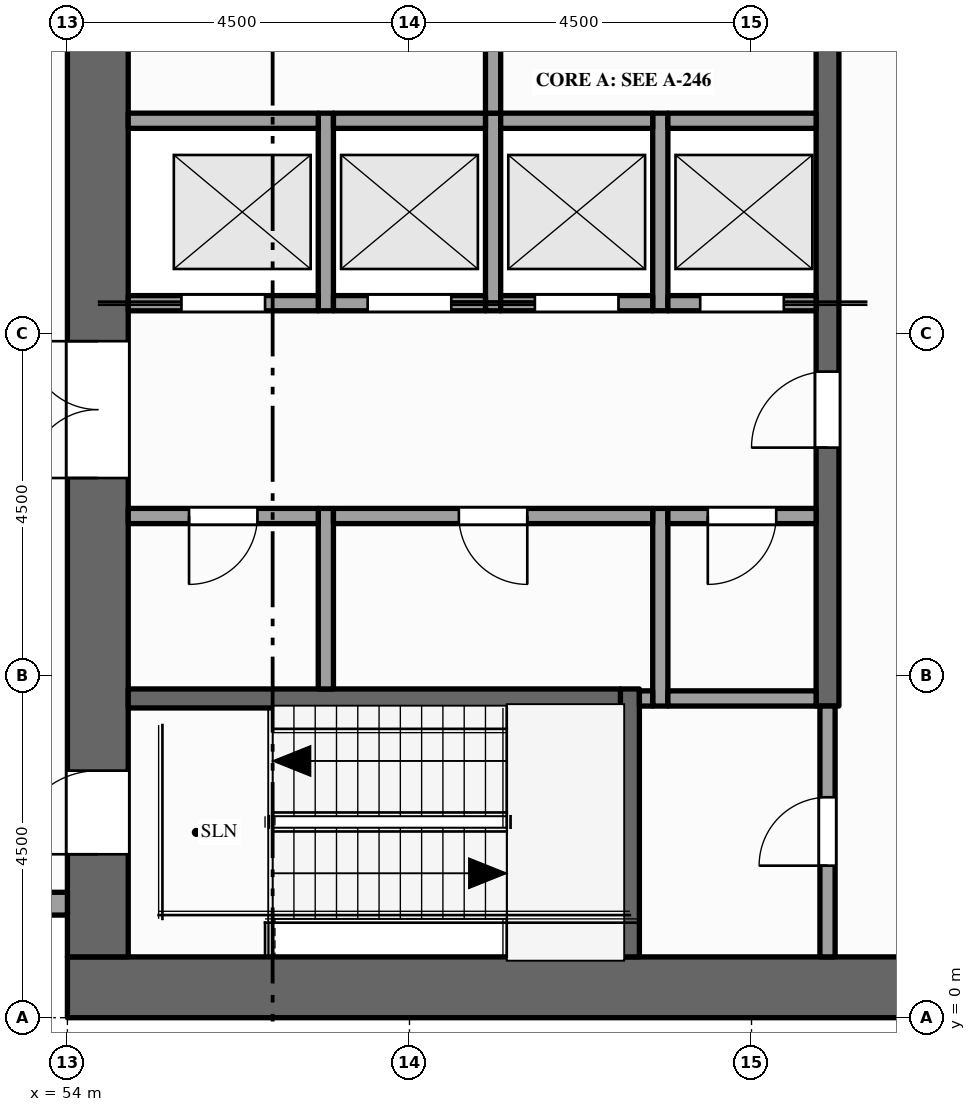
"""IFC4 building model, lengths in metres.
Left out: names, types, materials, properties, quantities, classifications, styles, units other than length and angle.
Written with IfcOpenShell. Run it as: python <this file> out.ifc"""

import sys

from ifc_helpers import new_model, si_unit, direction, frame, frame_2d, origin, place, context, subcontext, project, spatial, rectangle, extrude, element, fill, save


model = new_model("IFC4")
c1 = context("Model", 3, precision=1e-05, world=origin(), true_north=direction((0.0, 1.0)))
c2 = subcontext(c1, "Body", "Model", "MODEL_VIEW")
j1 = project(units=[si_unit("LENGTHUNIT", "METRE"), si_unit("PLANEANGLEUNIT", "RADIAN")], contexts=[c1])
p1 = place(None, origin())
s1 = spatial("IfcSite", under=j1, at=p1, CompositionType="ELEMENT")
p2 = place(p1, origin())
s2 = spatial("IfcBuilding", under=s1, at=p2, CompositionType="ELEMENT")
p3 = place(p2, frame((0.0, 0.0, 261.0)))
s3 = spatial("IfcBuildingStorey", under=s2, at=p3, CompositionType="ELEMENT", Elevation=261.0)
p4 = place(p3, frame((67.5, 0.4, -0.15), z_axis=(0.0, 0.0, 1.0), x_axis=(-1.0, 0.0, 0.0)))
e1 = element("IfcWall", 1, at=p4, inside=s3, PredefinedType="SHEAR", context=c2, shape_type="SweptSolid", body=[
    extrude(rectangle(XDim=13.5, YDim=0.8, at=frame_2d((6.75, 0.0))), origin(), (0.0, 0.0, 1.0), 4.0),
])
p5 = place(p3, frame((54.4, 0.8, -0.15), z_axis=(0.0, 0.0, 1.0), x_axis=(0.0, 1.0, 0.0)))
e2 = element("IfcWall", 2, at=p5, inside=s3, PredefinedType="SHEAR", context=c2, shape_type="SweptSolid", body=[
    extrude(rectangle(XDim=20.9, YDim=0.8, at=frame_2d((10.45, 0.0))), origin(), (0.0, 0.0, 1.0), 4.0),
])
p6 = place(p5, frame((6.3, 0.0, 0.15)))
e3 = element("IfcOpeningElement", 3, at=p6, cuts=e2, PredefinedType="OPENING", context=c2, shape_type="SweptSolid", body=[
    extrude(rectangle(XDim=1.8, YDim=2.1, at=frame_2d((0.9, 1.05))), frame((0.0, 0.41, 0.0), z_axis=(0.0, -1.0, 0.0), x_axis=(1.0, 0.0, 0.0)), (0.0, 0.0, 1.0), 0.82),
])
p7 = place(p5, frame((12.35, 0.0, 0.15)))
e4 = element("IfcOpeningElement", 4, at=p7, cuts=e2, PredefinedType="OPENING", context=c2, shape_type="SweptSolid", body=[
    extrude(rectangle(XDim=1.1, YDim=2.1, at=frame_2d((0.55, 1.05))), frame((0.0, 0.41, 0.0), z_axis=(0.0, -1.0, 0.0), x_axis=(1.0, 0.0, 0.0)), (0.0, 0.0, 1.0), 0.82),
])
p8 = place(p5, frame((1.35, 0.0, 0.15)))
e5 = element("IfcOpeningElement", 5, at=p8, cuts=e2, PredefinedType="OPENING", context=c2, shape_type="SweptSolid", body=[
    extrude(rectangle(XDim=1.1, YDim=2.1, at=frame_2d((0.55, 1.05))), frame((0.0, 0.41, 0.0), z_axis=(0.0, -1.0, 0.0), x_axis=(1.0, 0.0, 0.0)), (0.0, 0.0, 1.0), 0.82),
])
p9 = place(p5, frame((18.55, 0.0, 0.15)))
e6 = element("IfcOpeningElement", 6, at=p9, cuts=e2, PredefinedType="OPENING", context=c2, shape_type="SweptSolid", body=[
    extrude(rectangle(XDim=1.1, YDim=2.1, at=frame_2d((0.55, 1.05))), frame((0.0, 0.41, 0.0), z_axis=(0.0, -1.0, 0.0), x_axis=(1.0, 0.0, 0.0)), (0.0, 0.0, 1.0), 0.82),
])
p10 = place(p3, frame((49.825, 1.5, 0.0), z_axis=(0.0, 0.0, 1.0), x_axis=(1.0, 0.0, 0.0)))
e7 = element("IfcWall", 7, at=p10, inside=s3, PredefinedType="STANDARD", context=c2, shape_type="SweptSolid", body=[
    extrude(rectangle(XDim=4.175, YDim=0.3, at=frame_2d((2.087, 0.0))), origin(), (0.0, 0.0, 1.0), 2.87),
])
p11 = place(p10, frame((0.413, 0.0, 0.9)))
e8 = element("IfcOpeningElement", 8, at=p11, cuts=e7, PredefinedType="OPENING", context=c2, shape_type="SweptSolid", body=[
    extrude(rectangle(XDim=1.2, YDim=1.75, at=frame_2d((0.6, 0.875))), frame((0.0, 0.16, 0.0), z_axis=(0.0, -1.0, 0.0), x_axis=(1.0, 0.0, 0.0)), (0.0, 0.0, 1.0), 0.32),
])
p12 = place(p10, frame((2.225, 0.0, 0.9)))
e9 = element("IfcOpeningElement", 9, at=p12, cuts=e7, PredefinedType="OPENING", context=c2, shape_type="SweptSolid", body=[
    extrude(rectangle(XDim=1.55, YDim=1.75, at=frame_2d((0.775, 0.875))), frame((0.0, 0.16, 0.0), z_axis=(0.0, -1.0, 0.0), x_axis=(1.0, 0.0, 0.0)), (0.0, 0.0, 1.0), 0.32),
])
p13 = place(p3, frame((57.4, 4.325, 0.0), z_axis=(0.0, 0.0, 1.0), x_axis=(0.0, 1.0, 0.0)))
e10 = element("IfcWall", 10, at=p13, inside=s3, PredefinedType="PARTITIONING", context=c2, shape_type="SweptSolid", body=[
    extrude(rectangle(XDim=2.375, YDim=0.2, at=frame_2d((1.188, 0.0))), origin(), (0.0, 0.0, 1.0), 3.85),
])
for number, where, z_axis, x_axis in (
    (11, (57.4, 9.3, 0.0), (0.0, 0.0, 1.0), (0.0, 1.0, 0.0)),
    (12, (59.6, 9.3, 0.0), (0.0, 0.0, 1.0), (0.0, 1.0, 0.0)),
):
    element("IfcWall", number, at=place(p3, frame(where, z_axis=z_axis, x_axis=x_axis)), inside=s3, PredefinedType="SOLIDWALL", context=c2, shape_type="SweptSolid", body=[
        extrude(rectangle(XDim=2.6, YDim=0.2, at=frame_2d((1.3, 0.0))), origin(), (0.0, 0.0, 1.0), 3.85),
    ])
p14 = place(p3, frame((59.6, 11.9, 0.0), z_axis=(0.0, 0.0, 1.0), x_axis=(0.0, 1.0, 0.0)))
e13 = element("IfcWall", 13, at=p14, inside=s3, PredefinedType="PARTITIONING", context=c2, shape_type="SweptSolid", body=[
    extrude(rectangle(XDim=3.6, YDim=0.2, at=frame_2d((1.8, 0.0))), origin(), (0.0, 0.0, 1.0), 3.85),
])
p15 = place(p14, frame((1.3, 0.0, 0.0)))
e14 = element("IfcOpeningElement", 14, at=p15, cuts=e13, PredefinedType="OPENING", context=c2, shape_type="SweptSolid", body=[
    extrude(rectangle(XDim=1.0, YDim=2.1, at=frame_2d((0.5, 1.05))), frame((0.0, 0.11, 0.0), z_axis=(0.0, -1.0, 0.0), x_axis=(1.0, 0.0, 0.0)), (0.0, 0.0, 1.0), 0.22),
])
p16 = place(p3, frame((61.4, 0.8, 0.0), z_axis=(0.0, 0.0, 1.0), x_axis=(0.0, 1.0, 0.0)))
e15 = element("IfcWall", 15, at=p16, inside=s3, PredefinedType="SHEAR", context=c2, shape_type="SweptSolid", body=[
    extrude(rectangle(XDim=3.525, YDim=0.25, at=frame_2d((1.762, 0.0))), origin(), (0.0, 0.0, 1.0), 3.85),
])
p17 = place(p3, frame((61.8, 4.1, 0.0), z_axis=(0.0, 0.0, 1.0), x_axis=(0.0, 1.0, 0.0)))
e16 = element("IfcWall", 16, at=p17, inside=s3, PredefinedType="PARTITIONING", context=c2, shape_type="SweptSolid", body=[
    extrude(rectangle(XDim=2.6, YDim=0.2, at=frame_2d((1.3, 0.0))), origin(), (0.0, 0.0, 1.0), 3.85),
])
p18 = place(p3, frame((61.8, 9.3, 0.0), z_axis=(0.0, 0.0, 1.0), x_axis=(0.0, 1.0, 0.0)))
e17 = element("IfcWall", 17, at=p18, inside=s3, PredefinedType="SOLIDWALL", context=c2, shape_type="SweptSolid", body=[
    extrude(rectangle(XDim=2.6, YDim=0.2, at=frame_2d((1.3, 0.0))), origin(), (0.0, 0.0, 1.0), 3.85),
])
p19 = place(p3, frame((64.0, 0.8, 0.0), z_axis=(0.0, 0.0, 1.0), x_axis=(0.0, 1.0, 0.0)))
e18 = element("IfcWall", 18, at=p19, inside=s3, PredefinedType="PARTITIONING", context=c2, shape_type="SweptSolid", body=[
    extrude(rectangle(XDim=3.3, YDim=0.2, at=frame_2d((1.65, 0.0))), origin(), (0.0, 0.0, 1.0), 3.85),
])
p20 = place(p19, frame((1.2, 0.0, 0.0)))
e19 = element("IfcOpeningElement", 19, at=p20, cuts=e18, PredefinedType="OPENING", context=c2, shape_type="SweptSolid", body=[
    extrude(rectangle(XDim=0.9, YDim=2.1, at=frame_2d((0.45, 1.05))), frame((0.0, 0.11, 0.0), z_axis=(0.0, -1.0, 0.0), x_axis=(1.0, 0.0, 0.0)), (0.0, 0.0, 1.0), 0.22),
])
p21 = place(p3, frame((64.0, 4.1, 0.0), z_axis=(0.0, 0.0, 1.0), x_axis=(0.0, 1.0, 0.0)))
e20 = element("IfcWall", 20, at=p21, inside=s3, PredefinedType="SHEAR", context=c2, shape_type="SweptSolid", body=[
    extrude(rectangle(XDim=14.5, YDim=0.3, at=frame_2d((7.25, 0.0))), origin(), (0.0, 0.0, 1.0), 3.85),
])
p22 = place(p21, frame((3.4, 0.0, 0.0)))
e21 = element("IfcOpeningElement", 21, at=p22, cuts=e20, PredefinedType="OPENING", context=c2, shape_type="SweptSolid", body=[
    extrude(rectangle(XDim=1.0, YDim=2.1, at=frame_2d((0.5, 1.05))), frame((0.0, 0.16, 0.0), z_axis=(0.0, -1.0, 0.0), x_axis=(1.0, 0.0, 0.0)), (0.0, 0.0, 1.0), 0.32),
])
p23 = place(p21, frame((9.1, 0.0, 0.0)))
e22 = element("IfcOpeningElement", 22, at=p23, cuts=e20, PredefinedType="OPENING", context=c2, shape_type="SweptSolid", body=[
    extrude(rectangle(XDim=1.0, YDim=2.1, at=frame_2d((0.5, 1.05))), frame((0.0, 0.16, 0.0), z_axis=(0.0, -1.0, 0.0), x_axis=(1.0, 0.0, 0.0)), (0.0, 0.0, 1.0), 0.32),
])
p24 = place(p3, frame((54.8, 4.2, 0.0), z_axis=(0.0, 0.0, 1.0), x_axis=(1.0, 0.0, 0.0)))
e23 = element("IfcWall", 23, at=p24, inside=s3, PredefinedType="SHEAR", context=c2, shape_type="SweptSolid", body=[
    extrude(rectangle(XDim=6.475, YDim=0.25, at=frame_2d((3.237, 0.0))), origin(), (0.0, 0.0, 1.0), 3.85),
])
p25 = place(p3, frame((61.525, 4.2, 0.0), z_axis=(0.0, 0.0, 1.0), x_axis=(1.0, 0.0, 0.0)))
e24 = element("IfcWall", 24, at=p25, inside=s3, PredefinedType="PARTITIONING", context=c2, shape_type="SweptSolid", body=[
    extrude(rectangle(XDim=0.175, YDim=0.2, at=frame_2d((0.087, 0.0))), origin(), (0.0, 0.0, 1.0), 3.85),
])
p26 = place(p3, frame((61.9, 4.2, 0.0), z_axis=(0.0, 0.0, 1.0), x_axis=(1.0, 0.0, 0.0)))
e25 = element("IfcWall", 25, at=p26, inside=s3, PredefinedType="PARTITIONING", context=c2, shape_type="SweptSolid", body=[
    extrude(rectangle(XDim=1.95, YDim=0.2, at=frame_2d((0.975, 0.0))), origin(), (0.0, 0.0, 1.0), 3.85),
])
p27 = place(p3, frame((54.8, 6.6, 0.0), z_axis=(0.0, 0.0, 1.0), x_axis=(1.0, 0.0, 0.0)))
e26 = element("IfcWall", 26, at=p27, inside=s3, PredefinedType="PARTITIONING", context=c2, shape_type="SweptSolid", body=[
    extrude(rectangle(XDim=2.5, YDim=0.2, at=frame_2d((1.25, 0.0))), origin(), (0.0, 0.0, 1.0), 3.85),
])
p28 = place(p27, frame((0.8, 0.0, 0.0)))
e27 = element("IfcOpeningElement", 27, at=p28, cuts=e26, PredefinedType="OPENING", context=c2, shape_type="SweptSolid", body=[
    extrude(rectangle(XDim=0.9, YDim=2.1, at=frame_2d((0.45, 1.05))), frame((0.0, 0.11, 0.0), z_axis=(0.0, -1.0, 0.0), x_axis=(1.0, 0.0, 0.0)), (0.0, 0.0, 1.0), 0.22),
])
p29 = place(p3, frame((57.5, 6.6, 0.0), z_axis=(0.0, 0.0, 1.0), x_axis=(1.0, 0.0, 0.0)))
e28 = element("IfcWall", 28, at=p29, inside=s3, PredefinedType="PARTITIONING", context=c2, shape_type="SweptSolid", body=[
    extrude(rectangle(XDim=4.2, YDim=0.2, at=frame_2d((2.1, 0.0))), origin(), (0.0, 0.0, 1.0), 3.85),
])
p30 = place(p29, frame((1.65, 0.0, 0.0)))
e29 = element("IfcOpeningElement", 29, at=p30, cuts=e28, PredefinedType="OPENING", context=c2, shape_type="SweptSolid", body=[
    extrude(rectangle(XDim=0.9, YDim=2.1, at=frame_2d((0.45, 1.05))), frame((0.0, 0.11, 0.0), z_axis=(0.0, -1.0, 0.0), x_axis=(1.0, 0.0, 0.0)), (0.0, 0.0, 1.0), 0.22),
])
p31 = place(p3, frame((61.9, 6.6, 0.0), z_axis=(0.0, 0.0, 1.0), x_axis=(1.0, 0.0, 0.0)))
e30 = element("IfcWall", 30, at=p31, inside=s3, PredefinedType="PARTITIONING", context=c2, shape_type="SweptSolid", body=[
    extrude(rectangle(XDim=1.95, YDim=0.2, at=frame_2d((0.975, 0.0))), origin(), (0.0, 0.0, 1.0), 3.85),
])
p32 = place(p31, frame((0.525, 0.0, 0.0)))
e31 = element("IfcOpeningElement", 31, at=p32, cuts=e30, PredefinedType="OPENING", context=c2, shape_type="SweptSolid", body=[
    extrude(rectangle(XDim=0.9, YDim=2.1, at=frame_2d((0.45, 1.05))), frame((0.0, 0.11, 0.0), z_axis=(0.0, -1.0, 0.0), x_axis=(1.0, 0.0, 0.0)), (0.0, 0.0, 1.0), 0.22),
])
p33 = place(p3, frame((54.8, 9.4, 0.0), z_axis=(0.0, 0.0, 1.0), x_axis=(1.0, 0.0, 0.0)))
e32 = element("IfcWall", 32, at=p33, inside=s3, PredefinedType="SOLIDWALL", context=c2, shape_type="SweptSolid", body=[
    extrude(rectangle(XDim=2.5, YDim=0.2, at=frame_2d((1.25, 0.0))), origin(), (0.0, 0.0, 1.0), 3.85),
])
p34 = place(p33, frame((0.7, 0.0, 0.012)))
e33 = element("IfcOpeningElement", 33, at=p34, cuts=e32, PredefinedType="OPENING", context=c2, shape_type="SweptSolid", body=[
    extrude(rectangle(XDim=1.1, YDim=2.1, at=frame_2d((0.55, 1.05))), frame((0.0, 0.11, 0.0), z_axis=(0.0, -1.0, 0.0), x_axis=(1.0, 0.0, 0.0)), (0.0, 0.0, 1.0), 0.22),
])
p35 = place(p3, frame((57.5, 9.4, 0.0), z_axis=(0.0, 0.0, 1.0), x_axis=(1.0, 0.0, 0.0)))
e34 = element("IfcWall", 34, at=p35, inside=s3, PredefinedType="SOLIDWALL", context=c2, shape_type="SweptSolid", body=[
    extrude(rectangle(XDim=2.0, YDim=0.2, at=frame_2d((1.0, 0.0))), origin(), (0.0, 0.0, 1.0), 3.85),
])
p36 = place(p35, frame((0.45, 0.0, 0.012)))
e35 = element("IfcOpeningElement", 35, at=p36, cuts=e34, PredefinedType="OPENING", context=c2, shape_type="SweptSolid", body=[
    extrude(rectangle(XDim=1.1, YDim=2.1, at=frame_2d((0.55, 1.05))), frame((0.0, 0.11, 0.0), z_axis=(0.0, -1.0, 0.0), x_axis=(1.0, 0.0, 0.0)), (0.0, 0.0, 1.0), 0.22),
])
p37 = place(p3, frame((59.7, 9.4, 0.0), z_axis=(0.0, 0.0, 1.0), x_axis=(1.0, 0.0, 0.0)))
e36 = element("IfcWall", 36, at=p37, inside=s3, PredefinedType="SOLIDWALL", context=c2, shape_type="SweptSolid", body=[
    extrude(rectangle(XDim=2.0, YDim=0.2, at=frame_2d((1.0, 0.0))), origin(), (0.0, 0.0, 1.0), 3.85),
])
p38 = place(p37, frame((0.45, 0.0, 0.012)))
e37 = element("IfcOpeningElement", 37, at=p38, cuts=e36, PredefinedType="OPENING", context=c2, shape_type="SweptSolid", body=[
    extrude(rectangle(XDim=1.1, YDim=2.1, at=frame_2d((0.55, 1.05))), frame((0.0, 0.11, 0.0), z_axis=(0.0, -1.0, 0.0), x_axis=(1.0, 0.0, 0.0)), (0.0, 0.0, 1.0), 0.22),
])
p39 = place(p3, frame((61.9, 9.4, 0.0), z_axis=(0.0, 0.0, 1.0), x_axis=(1.0, 0.0, 0.0)))
e38 = element("IfcWall", 38, at=p39, inside=s3, PredefinedType="SOLIDWALL", context=c2, shape_type="SweptSolid", body=[
    extrude(rectangle(XDim=1.95, YDim=0.2, at=frame_2d((0.975, 0.0))), origin(), (0.0, 0.0, 1.0), 3.85),
])
p40 = place(p39, frame((0.425, 0.0, 0.012)))
e39 = element("IfcOpeningElement", 39, at=p40, cuts=e38, PredefinedType="OPENING", context=c2, shape_type="SweptSolid", body=[
    extrude(rectangle(XDim=1.1, YDim=2.1, at=frame_2d((0.55, 1.05))), frame((0.0, 0.11, 0.0), z_axis=(0.0, -1.0, 0.0), x_axis=(1.0, 0.0, 0.0)), (0.0, 0.0, 1.0), 0.22),
])
p41 = place(p3, frame((54.8, 11.8, 0.0), z_axis=(0.0, 0.0, 1.0), x_axis=(1.0, 0.0, 0.0)))
e40 = element("IfcWall", 40, at=p41, inside=s3, PredefinedType="SOLIDWALL", context=c2, shape_type="SweptSolid", body=[
    extrude(rectangle(XDim=2.5, YDim=0.2, at=frame_2d((1.25, 0.0))), origin(), (0.0, 0.0, 1.0), 3.85),
])
for number, where, z_axis, x_axis in (
    (41, (57.5, 11.8, 0.0), (0.0, 0.0, 1.0), (1.0, 0.0, 0.0)),
    (42, (59.7, 11.8, 0.0), (0.0, 0.0, 1.0), (1.0, 0.0, 0.0)),
):
    element("IfcWall", number, at=place(p3, frame(where, z_axis=z_axis, x_axis=x_axis)), inside=s3, PredefinedType="SOLIDWALL", context=c2, shape_type="SweptSolid", body=[
        extrude(rectangle(XDim=2.0, YDim=0.2, at=frame_2d((1.0, 0.0))), origin(), (0.0, 0.0, 1.0), 3.85),
    ])
p42 = place(p3, frame((61.9, 11.8, 0.0), z_axis=(0.0, 0.0, 1.0), x_axis=(1.0, 0.0, 0.0)))
e43 = element("IfcWall", 43, at=p42, inside=s3, PredefinedType="SOLIDWALL", context=c2, shape_type="SweptSolid", body=[
    extrude(rectangle(XDim=1.95, YDim=0.2, at=frame_2d((0.975, 0.0))), origin(), (0.0, 0.0, 1.0), 3.85),
])
p43 = place(p34, origin())
e44 = element("IfcDoor", 44, at=p43, inside=s3, OperationType="SLIDING_TO_LEFT", PredefinedType="DOOR", context=c2, shape_type="SweptSolid", body=[
    extrude(rectangle(XDim=1.1, YDim=2.1, at=frame_2d((0.55, 1.05))), frame((0.0, 0.025, 0.0), z_axis=(0.0, -1.0, 0.0), x_axis=(1.0, 0.0, 0.0)), (0.0, 0.0, 1.0), 0.05),
])
fill(e33, e44)
p44 = place(p36, origin())
e45 = element("IfcDoor", 45, at=p44, inside=s3, OperationType="SLIDING_TO_RIGHT", PredefinedType="DOOR", context=c2, shape_type="SweptSolid", body=[
    extrude(rectangle(XDim=1.1, YDim=2.1, at=frame_2d((0.55, 1.05))), frame((0.0, 0.025, 0.0), z_axis=(0.0, -1.0, 0.0), x_axis=(1.0, 0.0, 0.0)), (0.0, 0.0, 1.0), 0.05),
])
fill(e35, e45)
p45 = place(p38, origin())
e46 = element("IfcDoor", 46, at=p45, inside=s3, OperationType="SLIDING_TO_LEFT", PredefinedType="DOOR", context=c2, shape_type="SweptSolid", body=[
    extrude(rectangle(XDim=1.1, YDim=2.1, at=frame_2d((0.55, 1.05))), frame((0.0, 0.025, 0.0), z_axis=(0.0, -1.0, 0.0), x_axis=(1.0, 0.0, 0.0)), (0.0, 0.0, 1.0), 0.05),
])
fill(e37, e46)
p46 = place(p40, origin())
e47 = element("IfcDoor", 47, at=p46, inside=s3, OperationType="SLIDING_TO_RIGHT", PredefinedType="DOOR", context=c2, shape_type="SweptSolid", body=[
    extrude(rectangle(XDim=1.1, YDim=2.1, at=frame_2d((0.55, 1.05))), frame((0.0, 0.025, 0.0), z_axis=(0.0, -1.0, 0.0), x_axis=(1.0, 0.0, 0.0)), (0.0, 0.0, 1.0), 0.05),
])
fill(e39, e47)
p47 = place(p6, origin())
e48 = element("IfcDoor", 48, at=p47, inside=s3, OperationType="DOUBLE_DOOR_SINGLE_SWING", PredefinedType="DOOR", context=c2, shape_type="SweptSolid", body=[
    extrude(rectangle(XDim=1.8, YDim=2.1, at=frame_2d((0.9, 1.05))), frame((0.0, 0.025, 0.0), z_axis=(0.0, -1.0, 0.0), x_axis=(1.0, 0.0, 0.0)), (0.0, 0.0, 1.0), 0.05),
])
fill(e3, e48)
p48 = place(p22, origin())
e49 = element("IfcDoor", 49, at=p48, inside=s3, OperationType="SINGLE_SWING_LEFT", PredefinedType="DOOR", context=c2, shape_type="SweptSolid", body=[
    extrude(rectangle(XDim=1.0, YDim=2.1, at=frame_2d((0.5, 1.05))), frame((0.0, 0.025, 0.0), z_axis=(0.0, -1.0, 0.0), x_axis=(1.0, 0.0, 0.0)), (0.0, 0.0, 1.0), 0.05),
])
fill(e21, e49)
p49 = place(p8, origin())
e50 = element("IfcDoor", 50, at=p49, inside=s3, OperationType="SINGLE_SWING_LEFT", PredefinedType="DOOR", context=c2, shape_type="SweptSolid", body=[
    extrude(rectangle(XDim=1.1, YDim=2.1, at=frame_2d((0.55, 1.05))), frame((0.0, 0.025, 0.0), z_axis=(0.0, -1.0, 0.0), x_axis=(1.0, 0.0, 0.0)), (0.0, 0.0, 1.0), 0.05),
])
fill(e5, e50)
p50 = place(p20, origin())
e51 = element("IfcDoor", 51, at=p50, inside=s3, OperationType="SINGLE_SWING_LEFT", PredefinedType="DOOR", context=c2, shape_type="SweptSolid", body=[
    extrude(rectangle(XDim=0.9, YDim=2.1, at=frame_2d((0.45, 1.05))), frame((0.0, 0.025, 0.0), z_axis=(0.0, -1.0, 0.0), x_axis=(1.0, 0.0, 0.0)), (0.0, 0.0, 1.0), 0.05),
])
fill(e19, e51)
p51 = place(p28, origin())
e52 = element("IfcDoor", 52, at=p51, inside=s3, OperationType="SINGLE_SWING_LEFT", PredefinedType="DOOR", context=c2, shape_type="SweptSolid", body=[
    extrude(rectangle(XDim=0.9, YDim=2.1, at=frame_2d((0.45, 1.05))), frame((0.0, 0.025, 0.0), z_axis=(0.0, -1.0, 0.0), x_axis=(1.0, 0.0, 0.0)), (0.0, 0.0, 1.0), 0.05),
])
fill(e27, e52)
p52 = place(p30, origin())
e53 = element("IfcDoor", 53, at=p52, inside=s3, OperationType="SINGLE_SWING_RIGHT", PredefinedType="DOOR", context=c2, shape_type="SweptSolid", body=[
    extrude(rectangle(XDim=0.9, YDim=2.1, at=frame_2d((0.45, 1.05))), frame((0.0, 0.025, 0.0), z_axis=(0.0, -1.0, 0.0), x_axis=(1.0, 0.0, 0.0)), (0.0, 0.0, 1.0), 0.05),
])
fill(e29, e53)
p53 = place(p32, origin())
e54 = element("IfcDoor", 54, at=p53, inside=s3, OperationType="SINGLE_SWING_LEFT", PredefinedType="DOOR", context=c2, shape_type="SweptSolid", body=[
    extrude(rectangle(XDim=0.9, YDim=2.1, at=frame_2d((0.45, 1.05))), frame((0.0, 0.025, 0.0), z_axis=(0.0, -1.0, 0.0), x_axis=(1.0, 0.0, 0.0)), (0.0, 0.0, 1.0), 0.05),
])
fill(e31, e54)
save(model, sys.argv[1])
